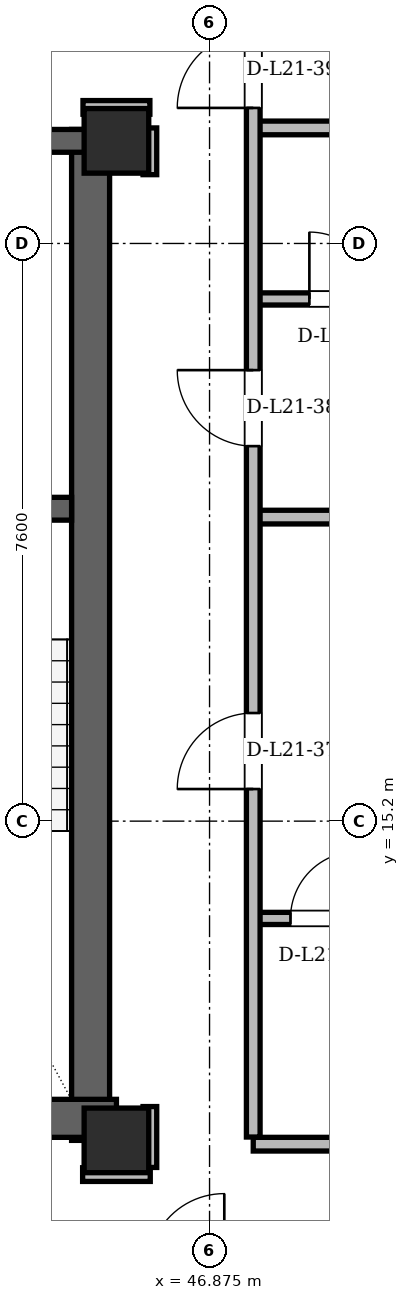
"""IFC4 building model, lengths in metres.
Left out: names, types, materials, properties, quantities, classifications, styles, units other than length and angle.
Written with IfcOpenShell. Run it as: python <this file> out.ifc"""

import sys

from ifc_helpers import new_model, si_unit, direction, frame, frame_2d, origin, origin_2d, place, context, subcontext, project, spatial, rectangle, hollow_rectangle, extrude, element, fill, save


model = new_model("IFC4")
c1 = context("Model", 3, precision=1e-05, world=origin(), true_north=direction((0.0, 1.0)))
c2 = subcontext(c1, "Body", "Model", "MODEL_VIEW")
j1 = project(units=[si_unit("LENGTHUNIT", "METRE"), si_unit("PLANEANGLEUNIT", "RADIAN")], contexts=[c1])
p1 = place(None, origin())
s1 = spatial("IfcSite", under=j1, at=p1, CompositionType="ELEMENT")
p2 = place(p1, origin())
s2 = spatial("IfcBuilding", under=s1, at=p2, CompositionType="ELEMENT")
p3 = place(p2, frame((0.0, 0.0, 82.5)))
s3 = spatial("IfcBuildingStorey", under=s2, at=p3, CompositionType="ELEMENT", Elevation=82.5)
for number, where, z_axis, x_axis in (
    (1, (45.65, 11.0, 0.0), (0.0, 0.0, 1.0), (1.0, 0.0, 0.0)),
    (2, (45.65, 24.15, 0.0), (0.0, 0.0, 1.0), (1.0, 0.0, 0.0)),
):
    element("IfcColumn", number, at=place(p3, frame(where, z_axis=z_axis, x_axis=x_axis)), inside=s3, PredefinedType="COLUMN", context=c2, shape_type="SweptSolid", body=[
        extrude(hollow_rectangle(XDim=0.85, YDim=0.85, WallThickness=0.07, at=origin_2d()), origin(), (0.0, 0.0, 1.0), 3.6),
    ])
p4 = place(p3, frame((45.31, 11.0, 0.0), z_axis=(0.0, 0.0, 1.0), x_axis=(0.0, 1.0, 0.0)))
e3 = element("IfcWall", 3, at=p4, inside=s3, PredefinedType="SHEAR", context=c2, shape_type="SweptSolid", body=[
    extrude(rectangle(XDim=13.3, YDim=0.5, at=frame_2d((6.65, 0.0))), origin(), (0.0, 0.0, 1.0), 3.36),
])
p5 = place(p3, frame((38.55, 11.29, 0.0), z_axis=(0.0, 0.0, 1.0), x_axis=(1.0, 0.0, 0.0)))
e4 = element("IfcWall", 4, at=p5, inside=s3, PredefinedType="SHEAR", context=c2, shape_type="SweptSolid", body=[
    extrude(rectangle(XDim=7.1, YDim=0.5, at=frame_2d((3.55, 0.0))), origin(), (0.0, 0.0, 1.0), 3.36),
])
p6 = place(p3, frame((29.65, 24.15, 0.0), z_axis=(0.0, 0.0, 1.0), x_axis=(1.0, 0.0, 0.0)))
e5 = element("IfcWall", 5, at=p6, inside=s3, PredefinedType="SHEAR", context=c2, shape_type="SweptSolid", body=[
    extrude(rectangle(XDim=15.7, YDim=0.3, at=frame_2d((7.85, 0.0))), origin(), (0.0, 0.0, 1.0), 3.36),
])
p7 = place(p6, frame((1.7, 0.0, 0.0)))
e6 = element("IfcOpeningElement", 6, at=p7, cuts=e5, PredefinedType="OPENING", context=c2, shape_type="SweptSolid", body=[
    extrude(rectangle(XDim=1.2, YDim=2.2, at=frame_2d((0.6, 1.1))), frame((0.0, 0.15, 0.0), z_axis=(0.0, -1.0, 0.0), x_axis=(1.0, 0.0, 0.0)), (0.0, 0.0, 1.0), 0.3),
])
p8 = place(p6, frame((12.8, 0.0, 0.0)))
e7 = element("IfcOpeningElement", 7, at=p8, cuts=e5, PredefinedType="OPENING", context=c2, shape_type="SweptSolid", body=[
    extrude(rectangle(XDim=1.2, YDim=2.2, at=frame_2d((0.6, 1.1))), frame((0.0, 0.15, 0.0), z_axis=(0.0, -1.0, 0.0), x_axis=(1.0, 0.0, 0.0)), (0.0, 0.0, 1.0), 0.3),
])
p9 = place(p6, frame((6.55, 0.0, 0.0)))
e8 = element("IfcOpeningElement", 8, at=p9, cuts=e5, PredefinedType="OPENING", context=c2, shape_type="SweptSolid", body=[
    extrude(rectangle(XDim=0.9, YDim=2.05, at=frame_2d((0.45, 1.025))), frame((0.0, 0.15, 0.0), z_axis=(0.0, -1.0, 0.0), x_axis=(1.0, 0.0, 0.0)), (0.0, 0.0, 1.0), 0.3),
])
p10 = place(p6, frame((8.45, 0.0, 0.0)))
e9 = element("IfcOpeningElement", 9, at=p10, cuts=e5, PredefinedType="OPENING", context=c2, shape_type="SweptSolid", body=[
    extrude(rectangle(XDim=0.9, YDim=2.05, at=frame_2d((0.45, 1.025))), frame((0.0, 0.15, 0.0), z_axis=(0.0, -1.0, 0.0), x_axis=(1.0, 0.0, 0.0)), (0.0, 0.0, 1.0), 0.3),
])
p11 = place(p3, frame((41.05, 19.31, 0.0), z_axis=(0.0, 0.0, 1.0), x_axis=(1.0, 0.0, 0.0)))
e10 = element("IfcWall", 10, at=p11, inside=s3, PredefinedType="SHEAR", context=c2, shape_type="SweptSolid", body=[
    extrude(rectangle(XDim=4.01, YDim=0.3, at=frame_2d((2.005, 0.0))), origin(), (0.0, 0.0, 1.0), 3.36),
])
p12 = place(p11, frame((1.6, 0.0, 0.0)))
e11 = element("IfcOpeningElement", 11, at=p12, cuts=e10, PredefinedType="OPENING", context=c2, shape_type="SweptSolid", body=[
    extrude(rectangle(XDim=1.4, YDim=2.2, at=frame_2d((0.7, 1.1))), frame((0.0, 0.15, 0.0), z_axis=(0.0, -1.0, 0.0), x_axis=(1.0, 0.0, 0.0)), (0.0, 0.0, 1.0), 0.3),
])
p13 = place(p3, frame((60.975, 13.961, 0.0), z_axis=(0.0, 0.0, 1.0), x_axis=(-0.499998999238, 0.866025981574, 0.0)))
e12 = element("IfcWall", 12, at=p13, inside=s3, PredefinedType="SOLIDWALL", context=c2, shape_type="SweptSolid", body=[
    extrude(rectangle(XDim=34.108, YDim=0.34, at=frame_2d((17.054, 0.0))), origin(), (0.0, 0.0, 1.0), 2.578),
])
p14 = place(p13, frame((6.369, 0.0, 0.0)))
e13 = element("IfcOpeningElement", 13, at=p14, cuts=e12, PredefinedType="OPENING", context=c2, shape_type="SweptSolid", body=[
    extrude(rectangle(XDim=1.5, YDim=2.2, at=frame_2d((0.75, 1.1))), frame((0.0, 0.17, 0.0), z_axis=(0.0, -1.0, 0.0), x_axis=(1.0, 0.0, 0.0)), (0.0, 0.0, 1.0), 0.34),
])
p15 = place(p13, frame((24.784, 0.0, 0.0)))
e14 = element("IfcOpeningElement", 14, at=p15, cuts=e12, PredefinedType="OPENING", context=c2, shape_type="SweptSolid", body=[
    extrude(rectangle(XDim=1.5, YDim=2.2, at=frame_2d((0.75, 1.1))), frame((0.0, 0.17, 0.0), z_axis=(0.0, -1.0, 0.0), x_axis=(1.0, 0.0, 0.0)), (0.0, 0.0, 1.0), 0.34),
])
p16 = place(p13, frame((1.56, 0.0, 0.85)))
e15 = element("IfcOpeningElement", 15, at=p16, cuts=e12, PredefinedType="OPENING", context=c2, shape_type="SweptSolid", body=[
    extrude(rectangle(XDim=1.2, YDim=1.48, at=frame_2d((0.6, 0.74))), frame((0.0, 0.17, 0.0), z_axis=(0.0, -1.0, 0.0), x_axis=(1.0, 0.0, 0.0)), (0.0, 0.0, 1.0), 0.34),
])
p17 = place(p13, frame((30.603, 0.0, 0.85)))
e16 = element("IfcOpeningElement", 16, at=p17, cuts=e12, PredefinedType="OPENING", context=c2, shape_type="SweptSolid", body=[
    extrude(rectangle(XDim=2.5, YDim=1.618, at=frame_2d((1.25, 0.809))), frame((0.0, 0.17, 0.0), z_axis=(0.0, -1.0, 0.0), x_axis=(1.0, 0.0, 0.0)), (0.0, 0.0, 1.0), 0.34),
])
p18 = place(p13, frame((20.212, 0.0, 0.85)))
e17 = element("IfcOpeningElement", 17, at=p18, cuts=e12, PredefinedType="OPENING", context=c2, shape_type="SweptSolid", body=[
    extrude(rectangle(XDim=2.4, YDim=1.618, at=frame_2d((1.2, 0.809))), frame((0.0, 0.17, 0.0), z_axis=(0.0, -1.0, 0.0), x_axis=(1.0, 0.0, 0.0)), (0.0, 0.0, 1.0), 0.34),
])
p19 = place(p13, frame((15.221, 0.0, 0.85)))
e18 = element("IfcOpeningElement", 18, at=p19, cuts=e12, PredefinedType="OPENING", context=c2, shape_type="SweptSolid", body=[
    extrude(rectangle(XDim=1.2, YDim=1.48, at=frame_2d((0.6, 0.74))), frame((0.0, 0.17, 0.0), z_axis=(0.0, -1.0, 0.0), x_axis=(1.0, 0.0, 0.0)), (0.0, 0.0, 1.0), 0.34),
])
p20 = place(p13, frame((17.561, 0.0, 0.85)))
e19 = element("IfcOpeningElement", 19, at=p20, cuts=e12, PredefinedType="OPENING", context=c2, shape_type="SweptSolid", body=[
    extrude(rectangle(XDim=1.4, YDim=1.6, at=frame_2d((0.7, 0.8))), frame((0.0, 0.17, 0.0), z_axis=(0.0, -1.0, 0.0), x_axis=(1.0, 0.0, 0.0)), (0.0, 0.0, 1.0), 0.34),
])
p21 = place(p3, frame((45.205, 10.55, 0.0), z_axis=(0.0, 0.0, 1.0), x_axis=(1.0, 0.0, 0.0)))
e20 = element("IfcWall", 20, at=p21, inside=s3, PredefinedType="PARTITIONING", context=c2, shape_type="SweptSolid", body=[
    extrude(rectangle(XDim=0.89, YDim=0.18, at=frame_2d((0.445, 0.0))), origin(), (0.0, 0.0, 1.0), 3.36),
])
p22 = place(p3, frame((47.45, 10.95, 0.0), z_axis=(0.0, 0.0, 1.0), x_axis=(1.0, 0.0, 0.0)))
e21 = element("IfcWall", 21, at=p22, inside=s3, PredefinedType="PARTITIONING", context=c2, shape_type="SweptSolid", body=[
    extrude(rectangle(XDim=11.586, YDim=0.18, at=frame_2d((5.793, 0.0))), origin(), (0.0, 0.0, 1.0), 3.36),
])
p23 = place(p3, frame((47.4, 13.92, 0.0), z_axis=(0.0, 0.0, 1.0), x_axis=(1.0, 0.0, 0.0)))
e22 = element("IfcWall", 22, at=p23, inside=s3, PredefinedType="PARTITIONING", context=c2, shape_type="SweptSolid", body=[
    extrude(rectangle(XDim=13.181, YDim=0.16, at=frame_2d((6.591, 0.0))), origin(), (0.0, 0.0, 1.0), 2.814),
])
p24 = place(p23, frame((0.54, 0.0, 0.0)))
e23 = element("IfcOpeningElement", 23, at=p24, cuts=e22, PredefinedType="OPENING", context=c2, shape_type="SweptSolid", body=[
    extrude(rectangle(XDim=0.88, YDim=2.08, at=frame_2d((0.44, 1.04))), frame((0.0, 0.08, 0.0), z_axis=(0.0, -1.0, 0.0), x_axis=(1.0, 0.0, 0.0)), (0.0, 0.0, 1.0), 0.16),
])
p25 = place(p23, frame((2.972, 0.0, 0.0)))
e24 = element("IfcOpeningElement", 24, at=p25, cuts=e22, PredefinedType="OPENING", context=c2, shape_type="SweptSolid", body=[
    extrude(rectangle(XDim=0.95, YDim=2.1, at=frame_2d((0.475, 1.05))), frame((0.0, 0.08, 0.0), z_axis=(0.0, -1.0, 0.0), x_axis=(1.0, 0.0, 0.0)), (0.0, 0.0, 1.0), 0.16),
])
p26 = place(p23, frame((5.621, 0.0, 0.0)))
e25 = element("IfcOpeningElement", 25, at=p26, cuts=e22, PredefinedType="OPENING", context=c2, shape_type="SweptSolid", body=[
    extrude(rectangle(XDim=0.95, YDim=2.1, at=frame_2d((0.475, 1.05))), frame((0.0, 0.08, 0.0), z_axis=(0.0, -1.0, 0.0), x_axis=(1.0, 0.0, 0.0)), (0.0, 0.0, 1.0), 0.16),
])
p27 = place(p23, frame((8.257, 0.0, 0.0)))
e26 = element("IfcOpeningElement", 26, at=p27, cuts=e22, PredefinedType="OPENING", context=c2, shape_type="SweptSolid", body=[
    extrude(rectangle(XDim=0.92, YDim=2.12, at=frame_2d((0.46, 1.06))), frame((0.0, 0.08, 0.0), z_axis=(0.0, -1.0, 0.0), x_axis=(1.0, 0.0, 0.0)), (0.0, 0.0, 1.0), 0.16),
])
p28 = place(p23, frame((10.834, 0.0, 0.0)))
e27 = element("IfcOpeningElement", 27, at=p28, cuts=e22, PredefinedType="OPENING", context=c2, shape_type="SweptSolid", body=[
    extrude(rectangle(XDim=0.95, YDim=2.1, at=frame_2d((0.475, 1.05))), frame((0.0, 0.08, 0.0), z_axis=(0.0, -1.0, 0.0), x_axis=(1.0, 0.0, 0.0)), (0.0, 0.0, 1.0), 0.16),
])
p29 = place(p3, frame((47.45, 19.2, 0.0), z_axis=(0.0, 0.0, 1.0), x_axis=(1.0, 0.0, 0.0)))
e28 = element("IfcWall", 28, at=p29, inside=s3, PredefinedType="PARTITIONING", context=c2, shape_type="SweptSolid", body=[
    extrude(rectangle(XDim=10.3, YDim=0.18, at=frame_2d((5.15, 0.0))), origin(), (0.0, 0.0, 1.0), 3.36),
])
p30 = place(p3, frame((47.4, 22.07, 0.0), z_axis=(0.0, 0.0, 1.0), x_axis=(1.0, 0.0, 0.0)))
e29 = element("IfcWall", 29, at=p30, inside=s3, PredefinedType="PARTITIONING", context=c2, shape_type="SweptSolid", body=[
    extrude(rectangle(XDim=8.693, YDim=0.16, at=frame_2d((4.346, 0.0))), origin(), (0.0, 0.0, 1.0), 3.36),
])
p31 = place(p30, frame((0.789, 0.0, 0.0)))
e30 = element("IfcOpeningElement", 30, at=p31, cuts=e29, PredefinedType="OPENING", context=c2, shape_type="SweptSolid", body=[
    extrude(rectangle(XDim=0.88, YDim=2.08, at=frame_2d((0.44, 1.04))), frame((0.0, 0.08, 0.0), z_axis=(0.0, -1.0, 0.0), x_axis=(1.0, 0.0, 0.0)), (0.0, 0.0, 1.0), 0.16),
])
p32 = place(p30, frame((3.487, 0.0, 0.0)))
e31 = element("IfcOpeningElement", 31, at=p32, cuts=e29, PredefinedType="OPENING", context=c2, shape_type="SweptSolid", body=[
    extrude(rectangle(XDim=0.95, YDim=2.1, at=frame_2d((0.475, 1.05))), frame((0.0, 0.08, 0.0), z_axis=(0.0, -1.0, 0.0), x_axis=(1.0, 0.0, 0.0)), (0.0, 0.0, 1.0), 0.16),
])
p33 = place(p30, frame((6.138, 0.0, 0.0)))
e32 = element("IfcOpeningElement", 32, at=p33, cuts=e29, PredefinedType="OPENING", context=c2, shape_type="SweptSolid", body=[
    extrude(rectangle(XDim=0.95, YDim=2.1, at=frame_2d((0.475, 1.05))), frame((0.0, 0.08, 0.0), z_axis=(0.0, -1.0, 0.0), x_axis=(1.0, 0.0, 0.0)), (0.0, 0.0, 1.0), 0.16),
])
p34 = place(p3, frame((47.45, 24.32, 0.0), z_axis=(0.0, 0.0, 1.0), x_axis=(1.0, 0.0, 0.0)))
e33 = element("IfcWall", 33, at=p34, inside=s3, PredefinedType="PARTITIONING", context=c2, shape_type="SweptSolid", body=[
    extrude(rectangle(XDim=7.344, YDim=0.18, at=frame_2d((3.672, 0.0))), origin(), (0.0, 0.0, 1.0), 3.36),
])
p35 = place(p3, frame((45.21, 24.59, 0.0), z_axis=(0.0, 0.0, 1.0), x_axis=(1.0, 0.0, 0.0)))
e34 = element("IfcWall", 34, at=p35, inside=s3, PredefinedType="PARTITIONING", context=c2, shape_type="SweptSolid", body=[
    extrude(rectangle(XDim=0.88, YDim=0.18, at=frame_2d((0.44, 0.0))), origin(), (0.0, 0.0, 1.0), 2.814),
])
p36 = place(p3, frame((46.09, 10.644, 0.0), z_axis=(0.0, 0.0, 1.0), x_axis=(0.0, 1.0, 0.0)))
e35 = element("IfcWall", 35, at=p36, inside=s3, PredefinedType="PARTITIONING", context=c2, shape_type="SweptSolid", body=[
    extrude(rectangle(XDim=0.801, YDim=0.18, at=frame_2d((0.4, 0.0))), origin(), (0.0, 0.0, 1.0), 2.814),
])
p37 = place(p3, frame((46.09, 23.705, 0.0), z_axis=(0.0, 0.0, 1.0), x_axis=(0.0, 1.0, 0.0)))
e36 = element("IfcWall", 36, at=p37, inside=s3, PredefinedType="PARTITIONING", context=c2, shape_type="SweptSolid", body=[
    extrude(rectangle(XDim=0.615, YDim=0.18, at=frame_2d((0.308, 0.0))), origin(), (0.0, 0.0, 1.0), 2.946),
])
p38 = place(p3, frame((47.45, 11.044, 0.0), z_axis=(0.0, 0.0, 1.0), x_axis=(0.0, 1.0, 0.0)))
e37 = element("IfcWall", 37, at=p38, inside=s3, PredefinedType="PARTITIONING", context=c2, shape_type="SweptSolid", body=[
    extrude(rectangle(XDim=14.832, YDim=0.18, at=frame_2d((7.416, 0.0))), origin(), (0.0, 0.0, 1.0), 2.814),
])
p39 = place(p38, frame((4.578, 0.0, 0.0)))
e38 = element("IfcOpeningElement", 38, at=p39, cuts=e37, PredefinedType="OPENING", context=c2, shape_type="SweptSolid", body=[
    extrude(rectangle(XDim=1.0, YDim=2.18, at=frame_2d((0.5, 1.09))), frame((0.0, 0.09, 0.0), z_axis=(0.0, -1.0, 0.0), x_axis=(1.0, 0.0, 0.0)), (0.0, 0.0, 1.0), 0.18),
])
p40 = place(p38, frame((9.09, 0.0, 0.0)))
e39 = element("IfcOpeningElement", 39, at=p40, cuts=e37, PredefinedType="OPENING", context=c2, shape_type="SweptSolid", body=[
    extrude(rectangle(XDim=1.0, YDim=2.18, at=frame_2d((0.5, 1.09))), frame((0.0, 0.09, 0.0), z_axis=(0.0, -1.0, 0.0), x_axis=(1.0, 0.0, 0.0)), (0.0, 0.0, 1.0), 0.18),
])
p41 = place(p38, frame((13.539, 0.0, 0.0)))
e40 = element("IfcOpeningElement", 40, at=p41, cuts=e37, PredefinedType="OPENING", context=c2, shape_type="SweptSolid", body=[
    extrude(rectangle(XDim=1.0, YDim=2.18, at=frame_2d((0.5, 1.09))), frame((0.0, 0.09, 0.0), z_axis=(0.0, -1.0, 0.0), x_axis=(1.0, 0.0, 0.0)), (0.0, 0.0, 1.0), 0.18),
])
p42 = place(p24, origin())
e41 = element("IfcDoor", 41, at=p42, inside=s3, OperationType="SINGLE_SWING_RIGHT", PredefinedType="DOOR", context=c2, shape_type="SweptSolid", body=[
    extrude(rectangle(XDim=0.88, YDim=2.08, at=frame_2d((0.44, 1.04))), frame((0.0, 0.025, 0.0), z_axis=(0.0, -1.0, 0.0), x_axis=(1.0, 0.0, 0.0)), (0.0, 0.0, 1.0), 0.05),
])
fill(e23, e41)
p43 = place(p31, origin())
e42 = element("IfcDoor", 42, at=p43, inside=s3, OperationType="SINGLE_SWING_LEFT", PredefinedType="DOOR", context=c2, shape_type="SweptSolid", body=[
    extrude(rectangle(XDim=0.88, YDim=2.08, at=frame_2d((0.44, 1.04))), frame((0.0, 0.025, 0.0), z_axis=(0.0, -1.0, 0.0), x_axis=(1.0, 0.0, 0.0)), (0.0, 0.0, 1.0), 0.05),
])
fill(e30, e42)
p44 = place(p39, origin())
e43 = element("IfcDoor", 43, at=p44, inside=s3, OperationType="SINGLE_SWING_LEFT", PredefinedType="DOOR", context=c2, shape_type="SweptSolid", body=[
    extrude(rectangle(XDim=1.0, YDim=2.18, at=frame_2d((0.5, 1.09))), frame((0.0, 0.025, 0.0), z_axis=(0.0, -1.0, 0.0), x_axis=(1.0, 0.0, 0.0)), (0.0, 0.0, 1.0), 0.05),
])
fill(e38, e43)
p45 = place(p40, origin())
e44 = element("IfcDoor", 44, at=p45, inside=s3, OperationType="SINGLE_SWING_RIGHT", PredefinedType="DOOR", context=c2, shape_type="SweptSolid", body=[
    extrude(rectangle(XDim=1.0, YDim=2.18, at=frame_2d((0.5, 1.09))), frame((0.0, 0.025, 0.0), z_axis=(0.0, -1.0, 0.0), x_axis=(1.0, 0.0, 0.0)), (0.0, 0.0, 1.0), 0.05),
])
fill(e39, e44)
p46 = place(p41, origin())
e45 = element("IfcDoor", 45, at=p46, inside=s3, OperationType="SINGLE_SWING_LEFT", PredefinedType="DOOR", context=c2, shape_type="SweptSolid", body=[
    extrude(rectangle(XDim=1.0, YDim=2.18, at=frame_2d((0.5, 1.09))), frame((0.0, 0.025, 0.0), z_axis=(0.0, -1.0, 0.0), x_axis=(1.0, 0.0, 0.0)), (0.0, 0.0, 1.0), 0.05),
])
fill(e40, e45)
save(model, sys.argv[1])
